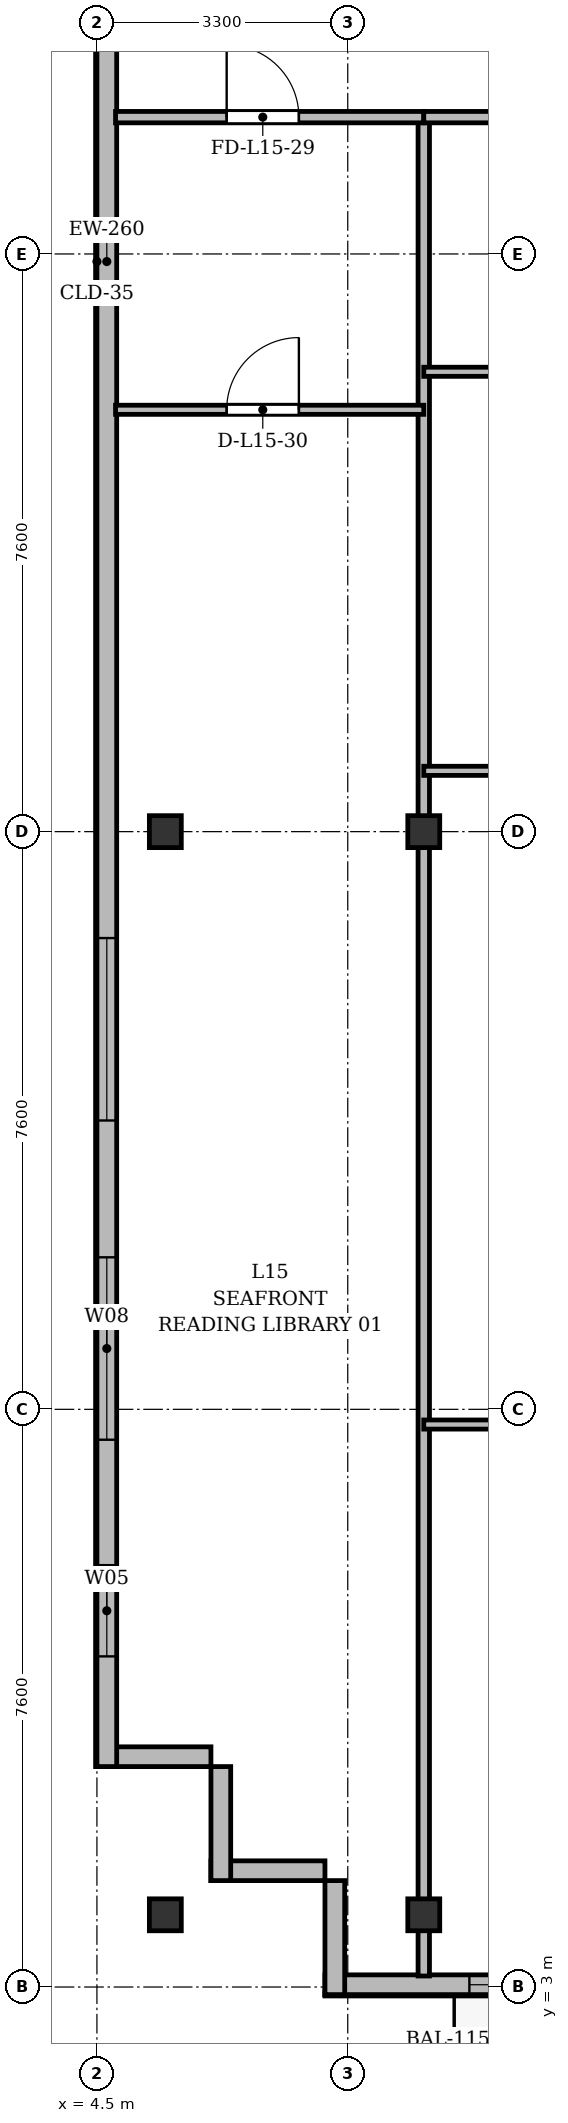
"""IFC4 building model, lengths in metres.
Left out: names, types, materials, properties, quantities, classifications, styles, units other than length and angle.
Written with IfcOpenShell. Run it as: python <this file> out.ifc"""

import sys

from ifc_helpers import new_model, si_unit, direction, frame, frame_2d, origin, origin_2d, place, context, subcontext, project, spatial, rectangle, i_section, extrude, source, transform, mapped, element, fill, save


model = new_model("IFC4")
c1 = context("Model", 3, precision=1e-05, world=origin(), true_north=direction((0.0, 1.0)))
c2 = subcontext(c1, "Body", "Model", "MODEL_VIEW")
j1 = project(units=[si_unit("LENGTHUNIT", "METRE"), si_unit("PLANEANGLEUNIT", "RADIAN")], contexts=[c1])
p1 = place(None, origin())
s1 = spatial("IfcSite", under=j1, at=p1, CompositionType="ELEMENT")
p2 = place(p1, origin())
s2 = spatial("IfcBuilding", under=s1, at=p2, CompositionType="ELEMENT")
p3 = place(p2, frame((0.0, 0.0, 59.5)))
s3 = spatial("IfcBuildingStorey", under=s2, at=p3, CompositionType="ELEMENT", Elevation=59.5)
m1 = source(origin(), c2, "Body", "SweptSolid", [
    extrude(i_section(OverallWidth=0.42, OverallDepth=0.42, WebThickness=0.026, FlangeThickness=0.04, at=origin_2d()), origin(), (0.0, 0.0, 1.0), 3.6),
])
for number, where, z_axis, x_axis in (
    (1, (5.4, 3.95, 0.0), (0.0, 0.0, 1.0), (1.0, 0.0, 0.0)),
    (2, (5.4, 18.2, 0.0), (0.0, 0.0, 1.0), (1.0, 0.0, 0.0)),
    (3, (8.8, 3.95, 0.0), (0.0, 0.0, 1.0), (1.0, 0.0, 0.0)),
    (4, (8.8, 18.2, 0.0), (0.0, 0.0, 1.0), (1.0, 0.0, 0.0)),
):
    element("IfcColumn", number, at=place(p3, frame(where, z_axis=z_axis, x_axis=x_axis)), inside=s3, PredefinedType="COLUMN", context=c2, shape_type="MappedRepresentation", body=[
        mapped(m1, transform((0.0, 0.0, 0.0), x_axis=(1.0, 0.0, 0.0), y_axis=(0.0, 1.0, 0.0), z_axis=(0.0, 0.0, 1.0), scale=1.0)),
    ])
for number, where, z_axis, x_axis in (
    (5, (7.5, 4.53, 0.0), (0.0, 0.0, 1.0), (-1.0, 0.0, 0.0)),
    (6, (6.13, 4.4, 0.0), (0.0, 0.0, 1.0), (0.0, 1.0, 0.0)),
):
    element("IfcWall", number, at=place(p3, frame(where, z_axis=z_axis, x_axis=x_axis)), inside=s3, PredefinedType="SOLIDWALL", context=c2, shape_type="SweptSolid", body=[
        extrude(rectangle(XDim=1.5, YDim=0.26, at=frame_2d((0.75, 0.0))), origin(), (0.0, 0.0, 1.0), 3.34),
    ])
p4 = place(p3, frame((6.0, 6.03, 0.0), z_axis=(0.0, 0.0, 1.0), x_axis=(-1.0, 0.0, 0.0)))
e7 = element("IfcWall", 7, at=p4, inside=s3, PredefinedType="SOLIDWALL", context=c2, shape_type="SweptSolid", body=[
    extrude(rectangle(XDim=1.5, YDim=0.26, at=frame_2d((0.75, 0.0))), origin(), (0.0, 0.0, 1.0), 2.752),
])
p5 = place(p3, frame((4.63, 5.9, 0.0), z_axis=(0.0, 0.0, 1.0), x_axis=(0.0, 1.0, 0.0)))
e8 = element("IfcWall", 8, at=p5, inside=s3, PredefinedType="SOLIDWALL", context=c2, shape_type="SweptSolid", body=[
    extrude(rectangle(XDim=39.6, YDim=0.26, at=frame_2d((19.8, 0.0))), origin(), (0.0, 0.0, 1.0), 3.34),
])
p6 = place(p5, frame((1.45, 0.0, 0.92)))
e9 = element("IfcOpeningElement", 9, at=p6, cuts=e8, PredefinedType="OPENING", context=c2, shape_type="SweptSolid", body=[
    extrude(rectangle(XDim=1.2, YDim=1.65, at=frame_2d((0.6, 0.825))), frame((0.0, 0.14, 0.0), z_axis=(0.0, -1.0, 0.0), x_axis=(1.0, 0.0, 0.0)), (0.0, 0.0, 1.0), 0.28),
])
p7 = place(p5, frame((4.3, 0.0, 0.92)))
e10 = element("IfcOpeningElement", 10, at=p7, cuts=e8, PredefinedType="OPENING", context=c2, shape_type="SweptSolid", body=[
    extrude(rectangle(XDim=2.4, YDim=2.1, at=frame_2d((1.2, 1.05))), frame((0.0, 0.14, 0.0), z_axis=(0.0, -1.0, 0.0), x_axis=(1.0, 0.0, 0.0)), (0.0, 0.0, 1.0), 0.28),
])
p8 = place(p5, frame((8.5, 0.0, 0.92)))
e11 = element("IfcOpeningElement", 11, at=p8, cuts=e8, PredefinedType="OPENING", context=c2, shape_type="SweptSolid", body=[
    extrude(rectangle(XDim=2.4, YDim=2.1, at=frame_2d((1.2, 1.05))), frame((0.0, 0.14, 0.0), z_axis=(0.0, -1.0, 0.0), x_axis=(1.0, 0.0, 0.0)), (0.0, 0.0, 1.0), 0.28),
])
p9 = place(p5, frame((29.7, 0.0, 0.92)))
e12 = element("IfcOpeningElement", 12, at=p9, cuts=e8, PredefinedType="OPENING", context=c2, shape_type="SweptSolid", body=[
    extrude(rectangle(XDim=2.4, YDim=2.1, at=frame_2d((1.2, 1.05))), frame((0.0, 0.14, 0.0), z_axis=(0.0, -1.0, 0.0), x_axis=(1.0, 0.0, 0.0)), (0.0, 0.0, 1.0), 0.28),
])
p10 = place(p5, frame((33.9, 0.0, 0.92)))
e13 = element("IfcOpeningElement", 13, at=p10, cuts=e8, PredefinedType="OPENING", context=c2, shape_type="SweptSolid", body=[
    extrude(rectangle(XDim=1.2, YDim=1.65, at=frame_2d((0.6, 0.825))), frame((0.0, 0.14, 0.0), z_axis=(0.0, -1.0, 0.0), x_axis=(1.0, 0.0, 0.0)), (0.0, 0.0, 1.0), 0.28),
])
p11 = place(p5, frame((37.25, 0.0, 0.92)))
e14 = element("IfcOpeningElement", 14, at=p11, cuts=e8, PredefinedType="OPENING", context=c2, shape_type="SweptSolid", body=[
    extrude(rectangle(XDim=1.2, YDim=1.65, at=frame_2d((0.6, 0.825))), frame((0.0, 0.14, 0.0), z_axis=(0.0, -1.0, 0.0), x_axis=(1.0, 0.0, 0.0)), (0.0, 0.0, 1.0), 0.28),
])
p12 = place(p3, frame((66.9, 3.03, 0.0), z_axis=(0.0, 0.0, 1.0), x_axis=(-1.0, 0.0, 0.0)))
e15 = element("IfcWall", 15, at=p12, inside=s3, PredefinedType="SOLIDWALL", context=c2, shape_type="SweptSolid", body=[
    extrude(rectangle(XDim=59.4, YDim=0.26, at=frame_2d((29.7, 0.0))), origin(), (0.0, 0.0, 1.0), 3.34),
])
p13 = place(p12, frame((3.6, 0.0, 0.9)))
e16 = element("IfcOpeningElement", 16, at=p13, cuts=e15, PredefinedType="OPENING", context=c2, shape_type="SweptSolid", body=[
    extrude(rectangle(XDim=2.2, YDim=1.8, at=frame_2d((1.1, 0.9))), frame((0.0, 0.14, 0.0), z_axis=(0.0, -1.0, 0.0), x_axis=(1.0, 0.0, 0.0)), (0.0, 0.0, 1.0), 0.28),
])
p14 = place(p12, frame((9.18, 0.0, 0.0)))
e17 = element("IfcOpeningElement", 17, at=p14, cuts=e15, PredefinedType="OPENING", context=c2, shape_type="SweptSolid", body=[
    extrude(rectangle(XDim=1.2, YDim=2.2, at=frame_2d((0.6, 1.1))), frame((0.0, 0.14, 0.0), z_axis=(0.0, -1.0, 0.0), x_axis=(1.0, 0.0, 0.0)), (0.0, 0.0, 1.0), 0.28),
])
p15 = place(p12, frame((12.95, 0.0, 0.9)))
e18 = element("IfcOpeningElement", 18, at=p15, cuts=e15, PredefinedType="OPENING", context=c2, shape_type="SweptSolid", body=[
    extrude(rectangle(XDim=2.0, YDim=1.95, at=frame_2d((1.0, 0.975))), frame((0.0, 0.14, 0.0), z_axis=(0.0, -1.0, 0.0), x_axis=(1.0, 0.0, 0.0)), (0.0, 0.0, 1.0), 0.28),
])
p16 = place(p12, frame((18.675, 0.0, 0.9)))
e19 = element("IfcOpeningElement", 19, at=p16, cuts=e15, PredefinedType="OPENING", context=c2, shape_type="SweptSolid", body=[
    extrude(rectangle(XDim=1.65, YDim=1.85, at=frame_2d((0.825, 0.925))), frame((0.0, 0.14, 0.0), z_axis=(0.0, -1.0, 0.0), x_axis=(1.0, 0.0, 0.0)), (0.0, 0.0, 1.0), 0.28),
])
p17 = place(p12, frame((24.1, 0.0, 0.9)))
e20 = element("IfcOpeningElement", 20, at=p17, cuts=e15, PredefinedType="OPENING", context=c2, shape_type="SweptSolid", body=[
    extrude(rectangle(XDim=1.8, YDim=1.8, at=frame_2d((0.9, 0.9))), frame((0.0, 0.14, 0.0), z_axis=(0.0, -1.0, 0.0), x_axis=(1.0, 0.0, 0.0)), (0.0, 0.0, 1.0), 0.28),
])
p18 = place(p12, frame((28.1, 0.0, 0.9)))
e21 = element("IfcOpeningElement", 21, at=p18, cuts=e15, PredefinedType="OPENING", context=c2, shape_type="SweptSolid", body=[
    extrude(rectangle(XDim=2.2, YDim=1.8, at=frame_2d((1.1, 0.9))), frame((0.0, 0.14, 0.0), z_axis=(0.0, -1.0, 0.0), x_axis=(1.0, 0.0, 0.0)), (0.0, 0.0, 1.0), 0.28),
])
p19 = place(p12, frame((33.15, 0.0, 0.9)))
e22 = element("IfcOpeningElement", 22, at=p19, cuts=e15, PredefinedType="OPENING", context=c2, shape_type="SweptSolid", body=[
    extrude(rectangle(XDim=1.5, YDim=1.75, at=frame_2d((0.75, 0.875))), frame((0.0, 0.14, 0.0), z_axis=(0.0, -1.0, 0.0), x_axis=(1.0, 0.0, 0.0)), (0.0, 0.0, 1.0), 0.28),
])
p20 = place(p12, frame((40.301, 0.0, 0.0)))
e23 = element("IfcOpeningElement", 23, at=p20, cuts=e15, PredefinedType="OPENING", context=c2, shape_type="SweptSolid", body=[
    extrude(rectangle(XDim=1.2, YDim=2.2, at=frame_2d((0.6, 1.1))), frame((0.0, 0.14, 0.0), z_axis=(0.0, -1.0, 0.0), x_axis=(1.0, 0.0, 0.0)), (0.0, 0.0, 1.0), 0.28),
])
p21 = place(p12, frame((46.575, 0.0, 0.9)))
e24 = element("IfcOpeningElement", 24, at=p21, cuts=e15, PredefinedType="OPENING", context=c2, shape_type="SweptSolid", body=[
    extrude(rectangle(XDim=1.65, YDim=1.85, at=frame_2d((0.825, 0.925))), frame((0.0, 0.14, 0.0), z_axis=(0.0, -1.0, 0.0), x_axis=(1.0, 0.0, 0.0)), (0.0, 0.0, 1.0), 0.28),
])
p22 = place(p12, frame((53.136, 0.0, 0.0)))
e25 = element("IfcOpeningElement", 25, at=p22, cuts=e15, PredefinedType="OPENING", context=c2, shape_type="SweptSolid", body=[
    extrude(rectangle(XDim=1.2, YDim=2.2, at=frame_2d((0.6, 1.1))), frame((0.0, 0.14, 0.0), z_axis=(0.0, -1.0, 0.0), x_axis=(1.0, 0.0, 0.0)), (0.0, 0.0, 1.0), 0.28),
])
p23 = place(p12, frame((55.3, 0.0, 0.9)))
e26 = element("IfcOpeningElement", 26, at=p23, cuts=e15, PredefinedType="OPENING", context=c2, shape_type="SweptSolid", body=[
    extrude(rectangle(XDim=2.2, YDim=1.8, at=frame_2d((1.1, 0.9))), frame((0.0, 0.14, 0.0), z_axis=(0.0, -1.0, 0.0), x_axis=(1.0, 0.0, 0.0)), (0.0, 0.0, 1.0), 0.28),
])
p24 = place(p3, frame((7.63, 2.9, 0.0), z_axis=(0.0, 0.0, 1.0), x_axis=(0.0, 1.0, 0.0)))
e27 = element("IfcWall", 27, at=p24, inside=s3, PredefinedType="SOLIDWALL", context=c2, shape_type="SweptSolid", body=[
    extrude(rectangle(XDim=1.5, YDim=0.26, at=frame_2d((0.75, 0.0))), origin(), (0.0, 0.0, 1.0), 2.69),
])
p25 = place(p3, frame((8.8, 3.145, 0.0), z_axis=(0.0, 0.0, 1.0), x_axis=(0.0, 1.0, 0.0)))
e28 = element("IfcWall", 28, at=p25, inside=s3, PredefinedType="PARTITIONING", context=c2, shape_type="SweptSolid", body=[
    extrude(rectangle(XDim=24.455, YDim=0.15, at=frame_2d((12.228, 0.0))), origin(), (0.0, 0.0, 1.0), 2.752),
])
p26 = place(p3, frame((4.745, 27.6, 0.0), z_axis=(0.0, 0.0, 1.0), x_axis=(1.0, 0.0, 0.0)))
e29 = element("IfcWall", 29, at=p26, inside=s3, PredefinedType="PARTITIONING", context=c2, shape_type="SweptSolid", body=[
    extrude(rectangle(XDim=4.055, YDim=0.15, at=frame_2d((2.027, 0.0))), origin(), (0.0, 0.0, 1.0), 2.752),
])
p27 = place(p26, frame((1.462, 0.0, 0.0)))
e30 = element("IfcOpeningElement", 30, at=p27, cuts=e29, PredefinedType="OPENING", context=c2, shape_type="SweptSolid", body=[
    extrude(rectangle(XDim=0.95, YDim=2.15, at=frame_2d((0.475, 1.075))), frame((0.0, 0.085, 0.0), z_axis=(0.0, -1.0, 0.0), x_axis=(1.0, 0.0, 0.0)), (0.0, 0.0, 1.0), 0.17),
])
p28 = place(p3, frame((4.745, 23.75, 0.0), z_axis=(0.0, 0.0, 1.0), x_axis=(1.0, 0.0, 0.0)))
e31 = element("IfcWall", 31, at=p28, inside=s3, PredefinedType="PARTITIONING", context=c2, shape_type="SweptSolid", body=[
    extrude(rectangle(XDim=4.055, YDim=0.12, at=frame_2d((2.027, 0.0))), origin(), (0.0, 0.0, 1.0), 2.752),
])
p29 = place(p28, frame((1.462, 0.0, 0.0)))
e32 = element("IfcOpeningElement", 32, at=p29, cuts=e31, PredefinedType="OPENING", context=c2, shape_type="SweptSolid", body=[
    extrude(rectangle(XDim=0.95, YDim=2.15, at=frame_2d((0.475, 1.075))), frame((0.0, 0.07, 0.0), z_axis=(0.0, -1.0, 0.0), x_axis=(1.0, 0.0, 0.0)), (0.0, 0.0, 1.0), 0.14),
])
p30 = place(p3, frame((8.8, 19.0, 0.0), z_axis=(0.0, 0.0, 1.0), x_axis=(1.0, 0.0, 0.0)))
e33 = element("IfcWall", 33, at=p30, inside=s3, PredefinedType="PARTITIONING", context=c2, shape_type="SweptSolid", body=[
    extrude(rectangle(XDim=6.8, YDim=0.12, at=frame_2d((3.4, 0.0))), origin(), (0.0, 0.0, 1.0), 2.752),
])
p31 = place(p30, frame((2.925, 0.0, 0.0)))
e34 = element("IfcOpeningElement", 34, at=p31, cuts=e33, PredefinedType="OPENING", context=c2, shape_type="SweptSolid", body=[
    extrude(rectangle(XDim=0.95, YDim=2.15, at=frame_2d((0.475, 1.075))), frame((0.0, 0.07, 0.0), z_axis=(0.0, -1.0, 0.0), x_axis=(1.0, 0.0, 0.0)), (0.0, 0.0, 1.0), 0.14),
])
p32 = place(p3, frame((8.8, 24.25, 0.0), z_axis=(0.0, 0.0, 1.0), x_axis=(1.0, 0.0, 0.0)))
e35 = element("IfcWall", 35, at=p32, inside=s3, PredefinedType="PARTITIONING", context=c2, shape_type="SweptSolid", body=[
    extrude(rectangle(XDim=2.362, YDim=0.12, at=frame_2d((1.181, 0.0))), origin(), (0.0, 0.0, 1.0), 2.752),
])
p33 = place(p3, frame((8.8, 27.6, 0.0), z_axis=(0.0, 0.0, 1.0), x_axis=(1.0, 0.0, 0.0)))
e36 = element("IfcWall", 36, at=p33, inside=s3, PredefinedType="PARTITIONING", context=c2, shape_type="SweptSolid", body=[
    extrude(rectangle(XDim=6.8, YDim=0.15, at=frame_2d((3.4, 0.0))), origin(), (0.0, 0.0, 1.0), 2.752),
])
p34 = place(p33, frame((4.49, 0.0, 0.0)))
e37 = element("IfcOpeningElement", 37, at=p34, cuts=e36, PredefinedType="OPENING", context=c2, shape_type="SweptSolid", body=[
    extrude(rectangle(XDim=0.95, YDim=2.15, at=frame_2d((0.475, 1.075))), frame((0.0, 0.085, 0.0), z_axis=(0.0, -1.0, 0.0), x_axis=(1.0, 0.0, 0.0)), (0.0, 0.0, 1.0), 0.17),
])
p35 = place(p3, frame((8.8, 10.4, 0.0), z_axis=(0.0, 0.0, 1.0), x_axis=(1.0, 0.0, 0.0)))
e38 = element("IfcWall", 38, at=p35, inside=s3, PredefinedType="PARTITIONING", context=c2, shape_type="SweptSolid", body=[
    extrude(rectangle(XDim=3.4, YDim=0.12, at=frame_2d((1.7, 0.0))), origin(), (0.0, 0.0, 1.0), 2.752),
])
p36 = place(p35, frame((1.131, 0.0, 0.0)))
e39 = element("IfcOpeningElement", 39, at=p36, cuts=e38, PredefinedType="OPENING", context=c2, shape_type="SweptSolid", body=[
    extrude(rectangle(XDim=0.95, YDim=2.15, at=frame_2d((0.475, 1.075))), frame((0.0, 0.07, 0.0), z_axis=(0.0, -1.0, 0.0), x_axis=(1.0, 0.0, 0.0)), (0.0, 0.0, 1.0), 0.14),
])
m2 = source(origin(), c2, "Body", "SweptSolid", [
    extrude(rectangle(XDim=1.2, YDim=1.65, at=frame_2d((0.6, 0.825))), frame((0.0, 0.03, 0.0), z_axis=(0.0, -1.0, 0.0), x_axis=(1.0, 0.0, 0.0)), (0.0, 0.0, 1.0), 0.06),
])
p37 = place(p6, origin())
e40 = element("IfcWindow", 40, at=p37, inside=s3, PartitioningType="SINGLE_PANEL", PredefinedType="WINDOW", context=c2, shape_type="MappedRepresentation", body=[
    mapped(m2, transform((0.0, 0.0, 0.0), x_axis=(1.0, 0.0, 0.0), y_axis=(0.0, 1.0, 0.0), z_axis=(0.0, 0.0, 1.0), scale=1.0)),
])
fill(e9, e40)
m3 = source(origin(), c2, "Body", "SweptSolid", [
    extrude(rectangle(XDim=2.4, YDim=2.1, at=frame_2d((1.2, 1.05))), frame((0.0, 0.03, 0.0), z_axis=(0.0, -1.0, 0.0), x_axis=(1.0, 0.0, 0.0)), (0.0, 0.0, 1.0), 0.06),
])
p38 = place(p7, origin())
e41 = element("IfcWindow", 41, at=p38, inside=s3, PartitioningType="SINGLE_PANEL", PredefinedType="WINDOW", context=c2, shape_type="MappedRepresentation", body=[
    mapped(m3, transform((0.0, 0.0, 0.0), x_axis=(1.0, 0.0, 0.0), y_axis=(0.0, 1.0, 0.0), z_axis=(0.0, 0.0, 1.0), scale=1.0)),
])
fill(e10, e41)
p39 = place(p8, origin())
e42 = element("IfcWindow", 42, at=p39, inside=s3, PartitioningType="SINGLE_PANEL", PredefinedType="WINDOW", context=c2, shape_type="MappedRepresentation", body=[
    mapped(m3, transform((0.0, 0.0, 0.0), x_axis=(1.0, 0.0, 0.0), y_axis=(0.0, 1.0, 0.0), z_axis=(0.0, 0.0, 1.0), scale=1.0)),
])
fill(e11, e42)
m4 = source(origin(), c2, "Body", "SweptSolid", [
    extrude(rectangle(XDim=2.2, YDim=1.8, at=frame_2d((1.1, 0.9))), frame((0.0, 0.03, 0.0), z_axis=(0.0, -1.0, 0.0), x_axis=(1.0, 0.0, 0.0)), (0.0, 0.0, 1.0), 0.06),
])
p40 = place(p23, origin())
e43 = element("IfcWindow", 43, at=p40, inside=s3, PartitioningType="SINGLE_PANEL", PredefinedType="WINDOW", context=c2, shape_type="MappedRepresentation", body=[
    mapped(m4, transform((0.0, 0.0, 0.0), x_axis=(1.0, 0.0, 0.0), y_axis=(0.0, 1.0, 0.0), z_axis=(0.0, 0.0, 1.0), scale=1.0)),
])
fill(e26, e43)
m5 = source(origin(), c2, "Body", "SweptSolid", [
    extrude(rectangle(XDim=0.95, YDim=2.15, at=frame_2d((0.475, 1.075))), frame((0.0, 0.025, 0.0), z_axis=(0.0, -1.0, 0.0), x_axis=(1.0, 0.0, 0.0)), (0.0, 0.0, 1.0), 0.05),
])
p41 = place(p27, origin())
e44 = element("IfcDoor", 44, at=p41, inside=s3, OperationType="SINGLE_SWING_LEFT", PredefinedType="DOOR", context=c2, shape_type="MappedRepresentation", body=[
    mapped(m5, transform((0.0, 0.0, 0.0), x_axis=(1.0, 0.0, 0.0), y_axis=(0.0, 1.0, 0.0), z_axis=(0.0, 0.0, 1.0), scale=1.0)),
])
fill(e30, e44)
p42 = place(p29, origin())
e45 = element("IfcDoor", 45, at=p42, inside=s3, OperationType="SINGLE_SWING_RIGHT", PredefinedType="DOOR", context=c2, shape_type="MappedRepresentation", body=[
    mapped(m5, transform((0.0, 0.0, 0.0), x_axis=(1.0, 0.0, 0.0), y_axis=(0.0, 1.0, 0.0), z_axis=(0.0, 0.0, 1.0), scale=1.0)),
])
fill(e32, e45)
save(model, sys.argv[1])
